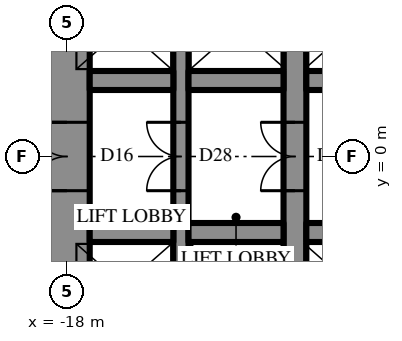
"""IFC4 building model, lengths in metres.
Left out: names, types, materials, properties, quantities, classifications, styles, units other than length and angle.
Written with IfcOpenShell. Run it as: python <this file> out.ifc"""

import sys

from ifc_helpers import new_model, si_unit, direction, frame, frame_2d, origin, place, context, subcontext, project, spatial, rectangle, extrude, element, fill, save


model = new_model("IFC4")
c1 = context("Model", 3, precision=1e-05, world=origin(), true_north=direction((0.0, 1.0)))
c2 = subcontext(c1, "Body", "Model", "MODEL_VIEW")
j1 = project(units=[si_unit("LENGTHUNIT", "METRE"), si_unit("PLANEANGLEUNIT", "RADIAN")], contexts=[c1])
p1 = place(None, origin())
s1 = spatial("IfcSite", under=j1, at=p1, CompositionType="ELEMENT")
p2 = place(p1, origin())
s2 = spatial("IfcBuilding", under=s1, at=p2, CompositionType="ELEMENT")
p3 = place(p2, frame((0.0, 0.0, 18.5)))
s3 = spatial("IfcBuildingStorey", under=s2, at=p3, CompositionType="ELEMENT", Elevation=18.5)
p4 = place(p3, frame((-18.0, 10.7, 0.0), z_axis=(0.0, 0.0, 1.0), x_axis=(0.0, -1.0, 0.0)))
e1 = element("IfcWall", 1, at=p4, inside=s3, PredefinedType="SHEAR", context=c2, shape_type="SweptSolid", body=[
    extrude(rectangle(XDim=21.4, YDim=1.2, at=frame_2d((10.7, 0.0))), origin(), (0.0, 0.0, 1.0), 5.0),
])
p5 = place(p4, frame((9.8, 0.0, 0.0)))
e2 = element("IfcOpeningElement", 2, at=p5, cuts=e1, PredefinedType="OPENING", context=c2, shape_type="SweptSolid", body=[
    extrude(rectangle(XDim=1.8, YDim=2.4, at=frame_2d((0.9, 1.2))), frame((0.0, 0.61, 0.0), z_axis=(0.0, -1.0, 0.0), x_axis=(1.0, 0.0, 0.0)), (0.0, 0.0, 1.0), 1.22),
])
p6 = place(p3, frame((-12.0, -10.7, 0.0), z_axis=(0.0, 0.0, 1.0), x_axis=(0.0, 1.0, 0.0)))
e3 = element("IfcWall", 3, at=p6, inside=s3, PredefinedType="SHEAR", context=c2, shape_type="SweptSolid", body=[
    extrude(rectangle(XDim=21.4, YDim=0.6, at=frame_2d((10.7, 0.0))), origin(), (0.0, 0.0, 1.0), 5.0),
])
p7 = place(p6, frame((9.8, 0.0, 0.0)))
e4 = element("IfcOpeningElement", 4, at=p7, cuts=e3, PredefinedType="OPENING", context=c2, shape_type="SweptSolid", body=[
    extrude(rectangle(XDim=1.8, YDim=2.4, at=frame_2d((0.9, 1.2))), frame((0.0, 0.31, 0.0), z_axis=(0.0, -1.0, 0.0), x_axis=(1.0, 0.0, 0.0)), (0.0, 0.0, 1.0), 0.62),
])
p8 = place(p3, frame((-15.0, -10.7, 0.0), z_axis=(0.0, 0.0, 1.0), x_axis=(0.0, 1.0, 0.0)))
e5 = element("IfcWall", 5, at=p8, inside=s3, PredefinedType="SHEAR", context=c2, shape_type="SweptSolid", body=[
    extrude(rectangle(XDim=21.4, YDim=0.4, at=frame_2d((10.7, 0.0))), origin(), (0.0, 0.0, 1.0), 5.0),
])
p9 = place(p8, frame((9.8, 0.0, 0.0)))
e6 = element("IfcOpeningElement", 6, at=p9, cuts=e5, PredefinedType="OPENING", context=c2, shape_type="SweptSolid", body=[
    extrude(rectangle(XDim=1.8, YDim=2.4, at=frame_2d((0.9, 1.2))), frame((0.0, 0.21, 0.0), z_axis=(0.0, -1.0, 0.0), x_axis=(1.0, 0.0, 0.0)), (0.0, 0.0, 1.0), 0.42),
])
p10 = place(p3, frame((-17.4, 2.0, 0.0), z_axis=(0.0, 0.0, 1.0), x_axis=(1.0, 0.0, 0.0)))
e7 = element("IfcWall", 7, at=p10, inside=s3, PredefinedType="SHEAR", context=c2, shape_type="SweptSolid", body=[
    extrude(rectangle(XDim=2.2, YDim=0.5, at=frame_2d((1.1, 0.0))), origin(), (0.0, 0.0, 1.0), 5.0),
])
p11 = place(p3, frame((-14.8, 2.0, 0.0), z_axis=(0.0, 0.0, 1.0), x_axis=(1.0, 0.0, 0.0)))
e8 = element("IfcWall", 8, at=p11, inside=s3, PredefinedType="SHEAR", context=c2, shape_type="SweptSolid", body=[
    extrude(rectangle(XDim=2.5, YDim=0.5, at=frame_2d((1.25, 0.0))), origin(), (0.0, 0.0, 1.0), 5.0),
])
p12 = place(p3, frame((-11.7, 2.0, 0.0), z_axis=(0.0, 0.0, 1.0), x_axis=(1.0, 0.0, 0.0)))
e9 = element("IfcWall", 9, at=p12, inside=s3, PredefinedType="SHEAR", context=c2, shape_type="SweptSolid", body=[
    extrude(rectangle(XDim=5.9, YDim=0.5, at=frame_2d((2.95, 0.0))), origin(), (0.0, 0.0, 1.0), 5.0),
])
p13 = place(p3, frame((3.2, -2.0, 0.0), z_axis=(0.0, 0.0, 1.0), x_axis=(-1.0, 0.0, 0.0)))
e10 = element("IfcWall", 10, at=p13, inside=s3, PredefinedType="SHEAR", context=c2, shape_type="SweptSolid", body=[
    extrude(rectangle(XDim=14.9, YDim=0.5, at=frame_2d((7.45, 0.0))), origin(), (0.0, 0.0, 1.0), 5.0),
])
p14 = place(p13, frame((1.15, 0.0, 0.0)))
e11 = element("IfcOpeningElement", 11, at=p14, cuts=e10, PredefinedType="OPENING", context=c2, shape_type="SweptSolid", body=[
    extrude(rectangle(XDim=1.1, YDim=2.2, at=frame_2d((0.55, 1.1))), frame((0.0, 0.26, 0.0), z_axis=(0.0, -1.0, 0.0), x_axis=(1.0, 0.0, 0.0)), (0.0, 0.0, 1.0), 0.52),
])
p15 = place(p13, frame((4.15, 0.0, 0.0)))
e12 = element("IfcOpeningElement", 12, at=p15, cuts=e10, PredefinedType="OPENING", context=c2, shape_type="SweptSolid", body=[
    extrude(rectangle(XDim=1.1, YDim=2.2, at=frame_2d((0.55, 1.1))), frame((0.0, 0.26, 0.0), z_axis=(0.0, -1.0, 0.0), x_axis=(1.0, 0.0, 0.0)), (0.0, 0.0, 1.0), 0.52),
])
p16 = place(p13, frame((7.15, 0.0, 0.0)))
e13 = element("IfcOpeningElement", 13, at=p16, cuts=e10, PredefinedType="OPENING", context=c2, shape_type="SweptSolid", body=[
    extrude(rectangle(XDim=1.1, YDim=2.2, at=frame_2d((0.55, 1.1))), frame((0.0, 0.26, 0.0), z_axis=(0.0, -1.0, 0.0), x_axis=(1.0, 0.0, 0.0)), (0.0, 0.0, 1.0), 0.52),
])
p17 = place(p13, frame((10.15, 0.0, 0.0)))
e14 = element("IfcOpeningElement", 14, at=p17, cuts=e10, PredefinedType="OPENING", context=c2, shape_type="SweptSolid", body=[
    extrude(rectangle(XDim=1.1, YDim=2.2, at=frame_2d((0.55, 1.1))), frame((0.0, 0.26, 0.0), z_axis=(0.0, -1.0, 0.0), x_axis=(1.0, 0.0, 0.0)), (0.0, 0.0, 1.0), 0.52),
])
p18 = place(p3, frame((-12.3, -2.0, 0.0), z_axis=(0.0, 0.0, 1.0), x_axis=(-1.0, 0.0, 0.0)))
e15 = element("IfcWall", 15, at=p18, inside=s3, PredefinedType="SHEAR", context=c2, shape_type="SweptSolid", body=[
    extrude(rectangle(XDim=2.5, YDim=0.5, at=frame_2d((1.25, 0.0))), origin(), (0.0, 0.0, 1.0), 5.0),
])
p19 = place(p3, frame((-15.2, -2.0, 0.0), z_axis=(0.0, 0.0, 1.0), x_axis=(-1.0, 0.0, 0.0)))
e16 = element("IfcWall", 16, at=p19, inside=s3, PredefinedType="SHEAR", context=c2, shape_type="SweptSolid", body=[
    extrude(rectangle(XDim=2.2, YDim=0.5, at=frame_2d((1.1, 0.0))), origin(), (0.0, 0.0, 1.0), 5.0),
])
p20 = place(p5, frame((1.8, 0.0, 0.0), z_axis=(0.0, 0.0, 1.0), x_axis=(-1.0, 0.0, 0.0)))
e17 = element("IfcDoor", 17, at=p20, inside=s3, OperationType="DOUBLE_DOOR_SINGLE_SWING", PredefinedType="DOOR", context=c2, shape_type="SweptSolid", body=[
    extrude(rectangle(XDim=1.8, YDim=2.4, at=frame_2d((0.9, 1.2))), frame((0.0, 0.025, 0.0), z_axis=(0.0, -1.0, 0.0), x_axis=(1.0, 0.0, 0.0)), (0.0, 0.0, 1.0), 0.05),
])
fill(e2, e17)
p21 = place(p7, origin())
e18 = element("IfcDoor", 18, at=p21, inside=s3, OperationType="DOUBLE_DOOR_SINGLE_SWING", PredefinedType="DOOR", context=c2, shape_type="SweptSolid", body=[
    extrude(rectangle(XDim=1.8, YDim=2.4, at=frame_2d((0.9, 1.2))), frame((0.0, 0.025, 0.0), z_axis=(0.0, -1.0, 0.0), x_axis=(1.0, 0.0, 0.0)), (0.0, 0.0, 1.0), 0.05),
])
fill(e4, e18)
p22 = place(p9, origin())
e19 = element("IfcDoor", 19, at=p22, inside=s3, OperationType="DOUBLE_DOOR_SINGLE_SWING", PredefinedType="DOOR", context=c2, shape_type="SweptSolid", body=[
    extrude(rectangle(XDim=1.8, YDim=2.4, at=frame_2d((0.9, 1.2))), frame((0.0, 0.025, 0.0), z_axis=(0.0, -1.0, 0.0), x_axis=(1.0, 0.0, 0.0)), (0.0, 0.0, 1.0), 0.05),
])
fill(e6, e19)
save(model, sys.argv[1])
